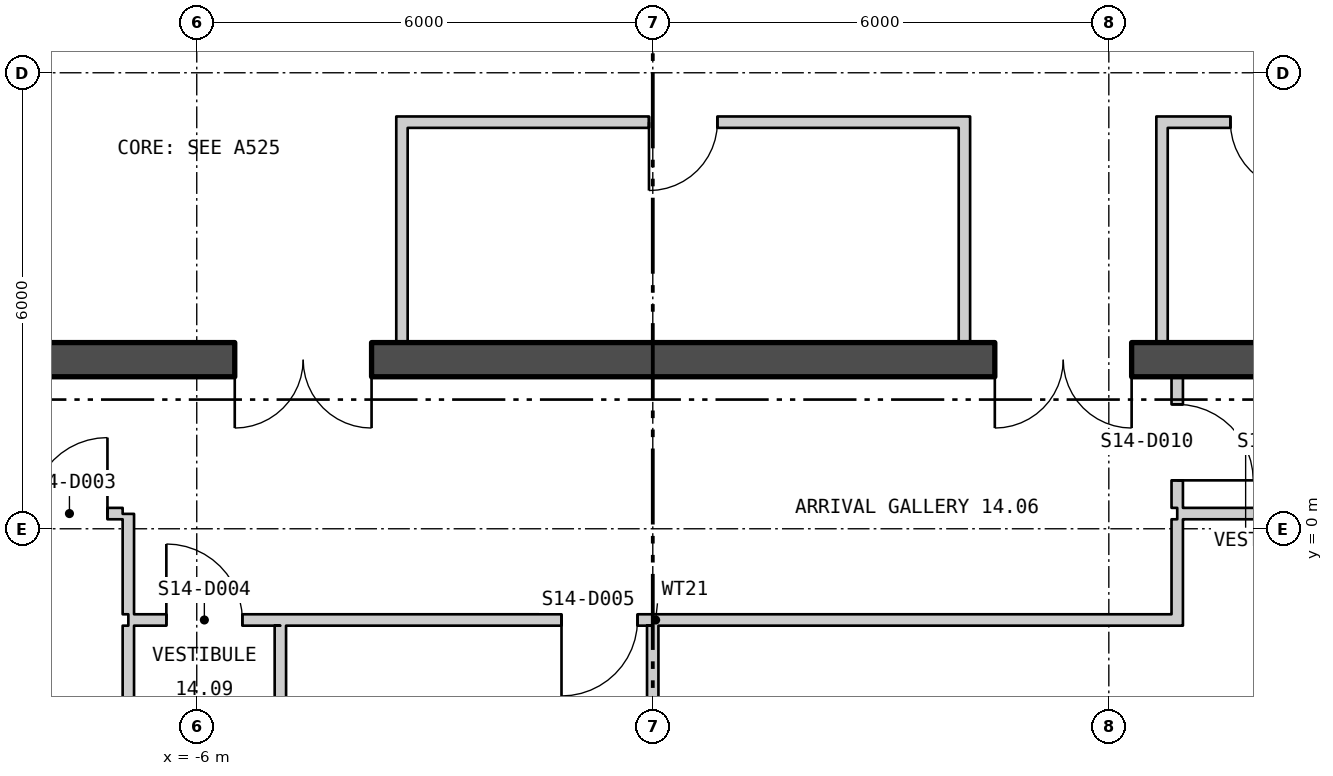
"""IFC4 building model, lengths in metres.
Left out: names, types, materials, properties, quantities, classifications, styles, units other than length and angle.
Written with IfcOpenShell. Run it as: python <this file> out.ifc"""

import sys

from ifc_helpers import new_model, si_unit, direction, frame, frame_2d, origin, place, context, subcontext, project, spatial, polyline, rectangle, outline, extrude, element, fill, save


model = new_model("IFC4")
c1 = context("Model", 3, precision=1e-05, world=origin(), true_north=direction((0.0, 1.0)))
c2 = subcontext(c1, "Body", "Model", "MODEL_VIEW")
j1 = project(units=[si_unit("LENGTHUNIT", "METRE"), si_unit("PLANEANGLEUNIT", "RADIAN")], contexts=[c1])
p1 = place(None, origin())
s1 = spatial("IfcSite", under=j1, at=p1, CompositionType="ELEMENT")
p2 = place(p1, origin())
s2 = spatial("IfcBuilding", under=s1, at=p2, CompositionType="ELEMENT")
p3 = place(p2, frame((0.0, 0.0, 192.6)))
s3 = spatial("IfcBuildingStorey", under=s2, at=p3, CompositionType="ELEMENT", Elevation=192.6)
p4 = place(p3, frame((-26.54, 13.618, -0.18), z_axis=(0.0, 0.0, 1.0), x_axis=(0.499999764979, -0.866025539474, 0.0)))
e1 = element("IfcWall", 1, at=p4, inside=s3, PredefinedType="SOLIDWALL", context=c2, shape_type="SweptSolid", body=[
    extrude(outline(polyline([(-0.13, -0.225), (45.87, -0.225), (45.61, 0.225), (0.13, 0.225), (-0.13, -0.225)])), origin(), (0.0, 0.0, 1.0), 3.68),
])
p5 = place(p4, frame((1.424, 0.0, 1.08)))
e2 = element("IfcOpeningElement", 2, at=p5, cuts=e1, PredefinedType="OPENING", context=c2, shape_type="SweptSolid", body=[
    extrude(rectangle(XDim=2.4, YDim=2.0, at=frame_2d((1.2, 1.0))), frame((0.0, 0.235, 0.0), z_axis=(0.0, -1.0, 0.0), x_axis=(1.0, 0.0, 0.0)), (0.0, 0.0, 1.0), 0.47),
])
p6 = place(p4, frame((5.893, 0.0, 1.08)))
e3 = element("IfcOpeningElement", 3, at=p6, cuts=e1, PredefinedType="OPENING", context=c2, shape_type="SweptSolid", body=[
    extrude(rectangle(XDim=2.4, YDim=2.0, at=frame_2d((1.2, 1.0))), frame((0.0, 0.235, 0.0), z_axis=(0.0, -1.0, 0.0), x_axis=(1.0, 0.0, 0.0)), (0.0, 0.0, 1.0), 0.47),
])
p7 = place(p4, frame((10.401, 0.0, 1.08)))
e4 = element("IfcOpeningElement", 4, at=p7, cuts=e1, PredefinedType="OPENING", context=c2, shape_type="SweptSolid", body=[
    extrude(rectangle(XDim=2.4, YDim=2.0, at=frame_2d((1.2, 1.0))), frame((0.0, 0.235, 0.0), z_axis=(0.0, -1.0, 0.0), x_axis=(1.0, 0.0, 0.0)), (0.0, 0.0, 1.0), 0.47),
])
p8 = place(p4, frame((14.909, 0.0, 1.08)))
e5 = element("IfcOpeningElement", 5, at=p8, cuts=e1, PredefinedType="OPENING", context=c2, shape_type="SweptSolid", body=[
    extrude(rectangle(XDim=2.4, YDim=2.0, at=frame_2d((1.2, 1.0))), frame((0.0, 0.235, 0.0), z_axis=(0.0, -1.0, 0.0), x_axis=(1.0, 0.0, 0.0)), (0.0, 0.0, 1.0), 0.47),
])
p9 = place(p4, frame((19.416, 0.0, 1.08)))
e6 = element("IfcOpeningElement", 6, at=p9, cuts=e1, PredefinedType="OPENING", context=c2, shape_type="SweptSolid", body=[
    extrude(rectangle(XDim=2.4, YDim=2.0, at=frame_2d((1.2, 1.0))), frame((0.0, 0.235, 0.0), z_axis=(0.0, -1.0, 0.0), x_axis=(1.0, 0.0, 0.0)), (0.0, 0.0, 1.0), 0.47),
])
p10 = place(p4, frame((23.924, 0.0, 1.08)))
e7 = element("IfcOpeningElement", 7, at=p10, cuts=e1, PredefinedType="OPENING", context=c2, shape_type="SweptSolid", body=[
    extrude(rectangle(XDim=2.4, YDim=2.0, at=frame_2d((1.2, 1.0))), frame((0.0, 0.235, 0.0), z_axis=(0.0, -1.0, 0.0), x_axis=(1.0, 0.0, 0.0)), (0.0, 0.0, 1.0), 0.47),
])
p11 = place(p4, frame((28.431, 0.0, 1.08)))
e8 = element("IfcOpeningElement", 8, at=p11, cuts=e1, PredefinedType="OPENING", context=c2, shape_type="SweptSolid", body=[
    extrude(rectangle(XDim=2.4, YDim=2.0, at=frame_2d((1.2, 1.0))), frame((0.0, 0.235, 0.0), z_axis=(0.0, -1.0, 0.0), x_axis=(1.0, 0.0, 0.0)), (0.0, 0.0, 1.0), 0.47),
])
p12 = place(p4, frame((32.939, 0.0, 1.08)))
e9 = element("IfcOpeningElement", 9, at=p12, cuts=e1, PredefinedType="OPENING", context=c2, shape_type="SweptSolid", body=[
    extrude(rectangle(XDim=2.4, YDim=2.0, at=frame_2d((1.2, 1.0))), frame((0.0, 0.235, 0.0), z_axis=(0.0, -1.0, 0.0), x_axis=(1.0, 0.0, 0.0)), (0.0, 0.0, 1.0), 0.47),
])
p13 = place(p4, frame((41.916, 0.0, 1.08)))
e10 = element("IfcOpeningElement", 10, at=p13, cuts=e1, PredefinedType="OPENING", context=c2, shape_type="SweptSolid", body=[
    extrude(rectangle(XDim=2.4, YDim=2.0, at=frame_2d((1.2, 1.0))), frame((0.0, 0.235, 0.0), z_axis=(0.0, -1.0, 0.0), x_axis=(1.0, 0.0, 0.0)), (0.0, 0.0, 1.0), 0.47),
])
p14 = place(p3, frame((3.67, -25.994, -0.18), z_axis=(0.0, 0.0, 1.0), x_axis=(0.499999764979, 0.866025539474, 0.0)))
e11 = element("IfcWall", 11, at=p14, inside=s3, PredefinedType="SOLIDWALL", context=c2, shape_type="SweptSolid", body=[
    extrude(outline(polyline([(-0.13, -0.225), (45.87, -0.225), (45.61, 0.225), (0.13, 0.225), (-0.13, -0.225)])), origin(), (0.0, 0.0, 1.0), 3.68),
])
p15 = place(p14, frame((1.424, 0.0, 1.08)))
e12 = element("IfcOpeningElement", 12, at=p15, cuts=e11, PredefinedType="OPENING", context=c2, shape_type="SweptSolid", body=[
    extrude(rectangle(XDim=2.4, YDim=2.0, at=frame_2d((1.2, 1.0))), frame((0.0, 0.235, 0.0), z_axis=(0.0, -1.0, 0.0), x_axis=(1.0, 0.0, 0.0)), (0.0, 0.0, 1.0), 0.47),
])
p16 = place(p14, frame((5.893, 0.0, 1.08)))
e13 = element("IfcOpeningElement", 13, at=p16, cuts=e11, PredefinedType="OPENING", context=c2, shape_type="SweptSolid", body=[
    extrude(rectangle(XDim=2.4, YDim=2.0, at=frame_2d((1.2, 1.0))), frame((0.0, 0.235, 0.0), z_axis=(0.0, -1.0, 0.0), x_axis=(1.0, 0.0, 0.0)), (0.0, 0.0, 1.0), 0.47),
])
p17 = place(p14, frame((10.401, 0.0, 1.08)))
e14 = element("IfcOpeningElement", 14, at=p17, cuts=e11, PredefinedType="OPENING", context=c2, shape_type="SweptSolid", body=[
    extrude(rectangle(XDim=2.4, YDim=2.0, at=frame_2d((1.2, 1.0))), frame((0.0, 0.235, 0.0), z_axis=(0.0, -1.0, 0.0), x_axis=(1.0, 0.0, 0.0)), (0.0, 0.0, 1.0), 0.47),
])
p18 = place(p14, frame((14.909, 0.0, 1.08)))
e15 = element("IfcOpeningElement", 15, at=p18, cuts=e11, PredefinedType="OPENING", context=c2, shape_type="SweptSolid", body=[
    extrude(rectangle(XDim=2.4, YDim=2.0, at=frame_2d((1.2, 1.0))), frame((0.0, 0.235, 0.0), z_axis=(0.0, -1.0, 0.0), x_axis=(1.0, 0.0, 0.0)), (0.0, 0.0, 1.0), 0.47),
])
p19 = place(p14, frame((19.416, 0.0, 1.08)))
e16 = element("IfcOpeningElement", 16, at=p19, cuts=e11, PredefinedType="OPENING", context=c2, shape_type="SweptSolid", body=[
    extrude(rectangle(XDim=2.4, YDim=2.0, at=frame_2d((1.2, 1.0))), frame((0.0, 0.235, 0.0), z_axis=(0.0, -1.0, 0.0), x_axis=(1.0, 0.0, 0.0)), (0.0, 0.0, 1.0), 0.47),
])
p20 = place(p14, frame((23.924, 0.0, 1.08)))
e17 = element("IfcOpeningElement", 17, at=p20, cuts=e11, PredefinedType="OPENING", context=c2, shape_type="SweptSolid", body=[
    extrude(rectangle(XDim=2.4, YDim=2.0, at=frame_2d((1.2, 1.0))), frame((0.0, 0.235, 0.0), z_axis=(0.0, -1.0, 0.0), x_axis=(1.0, 0.0, 0.0)), (0.0, 0.0, 1.0), 0.47),
])
p21 = place(p14, frame((28.431, 0.0, 1.08)))
e18 = element("IfcOpeningElement", 18, at=p21, cuts=e11, PredefinedType="OPENING", context=c2, shape_type="SweptSolid", body=[
    extrude(rectangle(XDim=2.4, YDim=2.0, at=frame_2d((1.2, 1.0))), frame((0.0, 0.235, 0.0), z_axis=(0.0, -1.0, 0.0), x_axis=(1.0, 0.0, 0.0)), (0.0, 0.0, 1.0), 0.47),
])
p22 = place(p14, frame((32.939, 0.0, 1.08)))
e19 = element("IfcOpeningElement", 19, at=p22, cuts=e11, PredefinedType="OPENING", context=c2, shape_type="SweptSolid", body=[
    extrude(rectangle(XDim=2.4, YDim=2.0, at=frame_2d((1.2, 1.0))), frame((0.0, 0.235, 0.0), z_axis=(0.0, -1.0, 0.0), x_axis=(1.0, 0.0, 0.0)), (0.0, 0.0, 1.0), 0.47),
])
p23 = place(p14, frame((37.447, 0.0, 1.08)))
e20 = element("IfcOpeningElement", 20, at=p23, cuts=e11, PredefinedType="OPENING", context=c2, shape_type="SweptSolid", body=[
    extrude(rectangle(XDim=2.4, YDim=2.0, at=frame_2d((1.2, 1.0))), frame((0.0, 0.235, 0.0), z_axis=(0.0, -1.0, 0.0), x_axis=(1.0, 0.0, 0.0)), (0.0, 0.0, 1.0), 0.47),
])
p24 = place(p14, frame((41.916, 0.0, 1.08)))
e21 = element("IfcOpeningElement", 21, at=p24, cuts=e11, PredefinedType="OPENING", context=c2, shape_type="SweptSolid", body=[
    extrude(rectangle(XDim=2.4, YDim=2.0, at=frame_2d((1.2, 1.0))), frame((0.0, 0.235, 0.0), z_axis=(0.0, -1.0, 0.0), x_axis=(1.0, 0.0, 0.0)), (0.0, 0.0, 1.0), 0.47),
])
p25 = place(p3, frame((-16.2, 2.225, 0.0), z_axis=(0.0, 0.0, 1.0), x_axis=(1.0, 0.0, 0.0)))
e22 = element("IfcWall", 22, at=p25, inside=s3, PredefinedType="SHEAR", context=c2, shape_type="SweptSolid", body=[
    extrude(rectangle(XDim=32.4, YDim=0.45, at=frame_2d((16.2, 0.0))), origin(), (0.0, 0.0, 1.0), 3.7),
])
p26 = place(p25, frame((10.7, 0.0, 0.0)))
e23 = element("IfcOpeningElement", 23, at=p26, cuts=e22, PredefinedType="OPENING", context=c2, shape_type="SweptSolid", body=[
    extrude(rectangle(XDim=1.8, YDim=2.4, at=frame_2d((0.9, 1.2))), frame((0.0, 0.235, 0.0), z_axis=(0.0, -1.0, 0.0), x_axis=(1.0, 0.0, 0.0)), (0.0, 0.0, 1.0), 0.47),
])
p27 = place(p25, frame((20.7, 0.0, 0.0)))
e24 = element("IfcOpeningElement", 24, at=p27, cuts=e22, PredefinedType="OPENING", context=c2, shape_type="SweptSolid", body=[
    extrude(rectangle(XDim=1.8, YDim=2.4, at=frame_2d((0.9, 1.2))), frame((0.0, 0.235, 0.0), z_axis=(0.0, -1.0, 0.0), x_axis=(1.0, 0.0, 0.0)), (0.0, 0.0, 1.0), 0.47),
])
for number, where, z_axis, x_axis in (
    (25, (-3.3, 2.45, 0.0), (0.0, 0.0, 1.0), (0.0, 1.0, 0.0)),
    (26, (4.1, 2.45, 0.0), (0.0, 0.0, 1.0), (0.0, 1.0, 0.0)),
):
    element("IfcWall", number, at=place(p3, frame(where, z_axis=z_axis, x_axis=x_axis)), inside=s3, PredefinedType="PARTITIONING", context=c2, shape_type="SweptSolid", body=[
        extrude(rectangle(XDim=2.975, YDim=0.15, at=frame_2d((1.488, 0.0))), origin(), (0.0, 0.0, 1.0), 3.7),
    ])
p28 = place(p3, frame((-3.225, 5.35, 0.0), z_axis=(0.0, 0.0, 1.0), x_axis=(1.0, 0.0, 0.0)))
e27 = element("IfcWall", 27, at=p28, inside=s3, PredefinedType="PARTITIONING", context=c2, shape_type="SweptSolid", body=[
    extrude(rectangle(XDim=7.25, YDim=0.15, at=frame_2d((3.625, 0.0))), origin(), (0.0, 0.0, 1.0), 3.7),
])
p29 = place(p28, frame((3.175, 0.0, 0.0)))
e28 = element("IfcOpeningElement", 28, at=p29, cuts=e27, PredefinedType="OPENING", context=c2, shape_type="SweptSolid", body=[
    extrude(rectangle(XDim=0.9, YDim=2.1, at=frame_2d((0.45, 1.05))), frame((0.0, 0.085, 0.0), z_axis=(0.0, -1.0, 0.0), x_axis=(1.0, 0.0, 0.0)), (0.0, 0.0, 1.0), 0.17),
])
p30 = place(p3, frame((6.7, 2.45, 0.0), z_axis=(0.0, 0.0, 1.0), x_axis=(0.0, 1.0, 0.0)))
e29 = element("IfcWall", 29, at=p30, inside=s3, PredefinedType="PARTITIONING", context=c2, shape_type="SweptSolid", body=[
    extrude(rectangle(XDim=2.975, YDim=0.15, at=frame_2d((1.488, 0.0))), origin(), (0.0, 0.0, 1.0), 3.7),
])
p31 = place(p3, frame((6.775, 5.35, 0.0), z_axis=(0.0, 0.0, 1.0), x_axis=(1.0, 0.0, 0.0)))
e30 = element("IfcWall", 30, at=p31, inside=s3, PredefinedType="PARTITIONING", context=c2, shape_type="SweptSolid", body=[
    extrude(rectangle(XDim=2.55, YDim=0.15, at=frame_2d((1.275, 0.0))), origin(), (0.0, 0.0, 1.0), 3.7),
])
p32 = place(p31, frame((0.825, 0.0, 0.0)))
e31 = element("IfcOpeningElement", 31, at=p32, cuts=e30, PredefinedType="OPENING", context=c2, shape_type="SweptSolid", body=[
    extrude(rectangle(XDim=0.9, YDim=2.1, at=frame_2d((0.45, 1.05))), frame((0.0, 0.085, 0.0), z_axis=(0.0, -1.0, 0.0), x_axis=(1.0, 0.0, 0.0)), (0.0, 0.0, 1.0), 0.17),
])
p33 = place(p3, frame((-17.925, 0.2, 0.0), z_axis=(0.0, 0.0, 1.0), x_axis=(1.0, 0.0, 0.0)))
e32 = element("IfcWall", 32, at=p33, inside=s3, PredefinedType="PARTITIONING", context=c2, shape_type="SweptSolid", body=[
    extrude(rectangle(XDim=10.95, YDim=0.15, at=frame_2d((5.475, 0.0))), origin(), (0.0, 0.0, 1.0), 3.7),
])
p34 = place(p33, frame((9.75, 0.0, 0.0)))
e33 = element("IfcOpeningElement", 33, at=p34, cuts=e32, PredefinedType="OPENING", context=c2, shape_type="SweptSolid", body=[
    extrude(rectangle(XDim=1.0, YDim=2.1, at=frame_2d((0.5, 1.05))), frame((0.0, 0.085, 0.0), z_axis=(0.0, -1.0, 0.0), x_axis=(1.0, 0.0, 0.0)), (0.0, 0.0, 1.0), 0.17),
])
p35 = place(p3, frame((-6.9, -3.412, 0.0), z_axis=(0.0, 0.0, 1.0), x_axis=(0.0, 1.0, 0.0)))
e34 = element("IfcWall", 34, at=p35, inside=s3, PredefinedType="PARTITIONING", context=c2, shape_type="SweptSolid", body=[
    extrude(rectangle(XDim=2.137, YDim=0.15, at=frame_2d((1.069, 0.0))), origin(), (0.0, 0.0, 1.0), 3.7),
])
p36 = place(p3, frame((-6.9, -1.2, 0.0), z_axis=(0.0, 0.0, 1.0), x_axis=(1.0, 0.0, 0.0)))
e35 = element("IfcWall", 35, at=p36, inside=s3, PredefinedType="PARTITIONING", context=c2, shape_type="SweptSolid", body=[
    extrude(rectangle(XDim=13.875, YDim=0.15, at=frame_2d((6.938, 0.0))), origin(), (0.0, 0.0, 1.0), 3.7),
])
p37 = place(p36, frame((0.5, 0.0, 0.0)))
e36 = element("IfcOpeningElement", 36, at=p37, cuts=e35, PredefinedType="OPENING", context=c2, shape_type="SweptSolid", body=[
    extrude(rectangle(XDim=1.0, YDim=2.1, at=frame_2d((0.5, 1.05))), frame((0.0, 0.085, 0.0), z_axis=(0.0, -1.0, 0.0), x_axis=(1.0, 0.0, 0.0)), (0.0, 0.0, 1.0), 0.17),
])
p38 = place(p36, frame((5.699, 0.0, 0.0)))
e37 = element("IfcOpeningElement", 37, at=p38, cuts=e35, PredefinedType="OPENING", context=c2, shape_type="SweptSolid", body=[
    extrude(rectangle(XDim=1.0, YDim=2.1, at=frame_2d((0.5, 1.05))), frame((0.0, 0.085, 0.0), z_axis=(0.0, -1.0, 0.0), x_axis=(1.0, 0.0, 0.0)), (0.0, 0.0, 1.0), 0.17),
])
p39 = place(p3, frame((-6.9, -1.125, 0.0), z_axis=(0.0, 0.0, 1.0), x_axis=(0.0, 1.0, 0.0)))
e38 = element("IfcWall", 38, at=p39, inside=s3, PredefinedType="PARTITIONING", context=c2, shape_type="SweptSolid", body=[
    extrude(rectangle(XDim=1.321, YDim=0.15, at=frame_2d((0.66, 0.0))), origin(), (0.0, 0.0, 1.0), 3.7),
])
p40 = place(p3, frame((-4.899, -3.48, 0.0), z_axis=(0.0, 0.0, 1.0), x_axis=(-0.000453514693, 0.999999897162, 0.0)))
e39 = element("IfcWall", 39, at=p40, inside=s3, PredefinedType="PARTITIONING", context=c2, shape_type="SweptSolid", body=[
    extrude(rectangle(XDim=2.205, YDim=0.15, at=frame_2d((1.103, 0.0))), origin(), (0.0, 0.0, 1.0), 3.7),
])
p41 = place(p3, frame((-0.001, -1.275, 0.0), z_axis=(0.0, 0.0, 1.0), x_axis=(0.000438356122, -0.999999903922, 0.0)))
e40 = element("IfcWall", 40, at=p41, inside=s3, PredefinedType="PARTITIONING", context=c2, shape_type="SweptSolid", body=[
    extrude(rectangle(XDim=1.825, YDim=0.15, at=frame_2d((0.912, 0.0))), origin(), (0.0, 0.0, 1.0), 3.15),
])
p42 = place(p3, frame((6.9, -1.125, 0.0), z_axis=(0.0, 0.0, 1.0), x_axis=(0.0, 1.0, 0.0)))
e41 = element("IfcWall", 41, at=p42, inside=s3, PredefinedType="PARTITIONING", context=c2, shape_type="SweptSolid", body=[
    extrude(rectangle(XDim=1.25, YDim=0.15, at=frame_2d((0.625, 0.0))), origin(), (0.0, 0.0, 1.0), 3.7),
])
p43 = place(p3, frame((6.9, 0.2, 0.0), z_axis=(0.0, 0.0, 1.0), x_axis=(1.0, 0.0, 0.0)))
e42 = element("IfcWall", 42, at=p43, inside=s3, PredefinedType="PARTITIONING", context=c2, shape_type="SweptSolid", body=[
    extrude(rectangle(XDim=11.025, YDim=0.15, at=frame_2d((5.513, 0.0))), origin(), (0.0, 0.0, 1.0), 3.7),
])
p44 = place(p3, frame((6.9, 0.275, 0.0), z_axis=(0.0, 0.0, 1.0), x_axis=(0.0, 1.0, 0.0)))
e43 = element("IfcWall", 43, at=p44, inside=s3, PredefinedType="PARTITIONING", context=c2, shape_type="SweptSolid", body=[
    extrude(rectangle(XDim=1.725, YDim=0.15, at=frame_2d((0.863, 0.0))), origin(), (0.0, 0.0, 1.0), 3.7),
])
p45 = place(p44, frame((0.362, 0.0, 0.0)))
e44 = element("IfcOpeningElement", 44, at=p45, cuts=e43, PredefinedType="OPENING", context=c2, shape_type="SweptSolid", body=[
    extrude(rectangle(XDim=1.0, YDim=2.1, at=frame_2d((0.5, 1.05))), frame((0.0, 0.085, 0.0), z_axis=(0.0, -1.0, 0.0), x_axis=(1.0, 0.0, 0.0)), (0.0, 0.0, 1.0), 0.17),
])
p46 = place(p29, origin())
e45 = element("IfcDoor", 45, at=p46, inside=s3, OperationType="SINGLE_SWING_LEFT", PredefinedType="DOOR", context=c2, shape_type="SweptSolid", body=[
    extrude(rectangle(XDim=0.9, YDim=2.1, at=frame_2d((0.45, 1.05))), frame((0.0, 0.025, 0.0), z_axis=(0.0, -1.0, 0.0), x_axis=(1.0, 0.0, 0.0)), (0.0, 0.0, 1.0), 0.05),
])
fill(e28, e45)
p47 = place(p32, origin())
e46 = element("IfcDoor", 46, at=p47, inside=s3, OperationType="SINGLE_SWING_RIGHT", PredefinedType="DOOR", context=c2, shape_type="SweptSolid", body=[
    extrude(rectangle(XDim=0.9, YDim=2.1, at=frame_2d((0.45, 1.05))), frame((0.0, 0.025, 0.0), z_axis=(0.0, -1.0, 0.0), x_axis=(1.0, 0.0, 0.0)), (0.0, 0.0, 1.0), 0.05),
])
fill(e31, e46)
p48 = place(p26, origin())
e47 = element("IfcDoor", 47, at=p48, inside=s3, OperationType="DOUBLE_DOOR_SINGLE_SWING", PredefinedType="DOOR", context=c2, shape_type="SweptSolid", body=[
    extrude(rectangle(XDim=1.8, YDim=2.4, at=frame_2d((0.9, 1.2))), frame((0.0, 0.025, 0.0), z_axis=(0.0, -1.0, 0.0), x_axis=(1.0, 0.0, 0.0)), (0.0, 0.0, 1.0), 0.05),
])
fill(e23, e47)
p49 = place(p27, origin())
e48 = element("IfcDoor", 48, at=p49, inside=s3, OperationType="DOUBLE_DOOR_SINGLE_SWING", PredefinedType="DOOR", context=c2, shape_type="SweptSolid", body=[
    extrude(rectangle(XDim=1.8, YDim=2.4, at=frame_2d((0.9, 1.2))), frame((0.0, 0.025, 0.0), z_axis=(0.0, -1.0, 0.0), x_axis=(1.0, 0.0, 0.0)), (0.0, 0.0, 1.0), 0.05),
])
fill(e24, e48)
p50 = place(p34, origin())
e49 = element("IfcDoor", 49, at=p50, inside=s3, OperationType="SINGLE_SWING_LEFT", PredefinedType="DOOR", context=c2, shape_type="SweptSolid", body=[
    extrude(rectangle(XDim=1.0, YDim=2.1, at=frame_2d((0.5, 1.05))), frame((0.0, 0.025, 0.0), z_axis=(0.0, -1.0, 0.0), x_axis=(1.0, 0.0, 0.0)), (0.0, 0.0, 1.0), 0.05),
])
fill(e33, e49)
p51 = place(p37, origin())
e50 = element("IfcDoor", 50, at=p51, inside=s3, OperationType="SINGLE_SWING_RIGHT", PredefinedType="DOOR", context=c2, shape_type="SweptSolid", body=[
    extrude(rectangle(XDim=1.0, YDim=2.1, at=frame_2d((0.5, 1.05))), frame((0.0, 0.025, 0.0), z_axis=(0.0, -1.0, 0.0), x_axis=(1.0, 0.0, 0.0)), (0.0, 0.0, 1.0), 0.05),
])
fill(e36, e50)
p52 = place(p38, origin())
e51 = element("IfcDoor", 51, at=p52, inside=s3, OperationType="SINGLE_SWING_LEFT", PredefinedType="DOOR", context=c2, shape_type="SweptSolid", body=[
    extrude(rectangle(XDim=1.0, YDim=2.1, at=frame_2d((0.5, 1.05))), frame((0.0, 0.025, 0.0), z_axis=(0.0, -1.0, 0.0), x_axis=(1.0, 0.0, 0.0)), (0.0, 0.0, 1.0), 0.05),
])
fill(e37, e51)
p53 = place(p45, origin())
e52 = element("IfcDoor", 52, at=p53, inside=s3, OperationType="SINGLE_SWING_LEFT", PredefinedType="DOOR", context=c2, shape_type="SweptSolid", body=[
    extrude(rectangle(XDim=1.0, YDim=2.1, at=frame_2d((0.5, 1.05))), frame((0.0, 0.025, 0.0), z_axis=(0.0, -1.0, 0.0), x_axis=(1.0, 0.0, 0.0)), (0.0, 0.0, 1.0), 0.05),
])
fill(e44, e52)
save(model, sys.argv[1])
